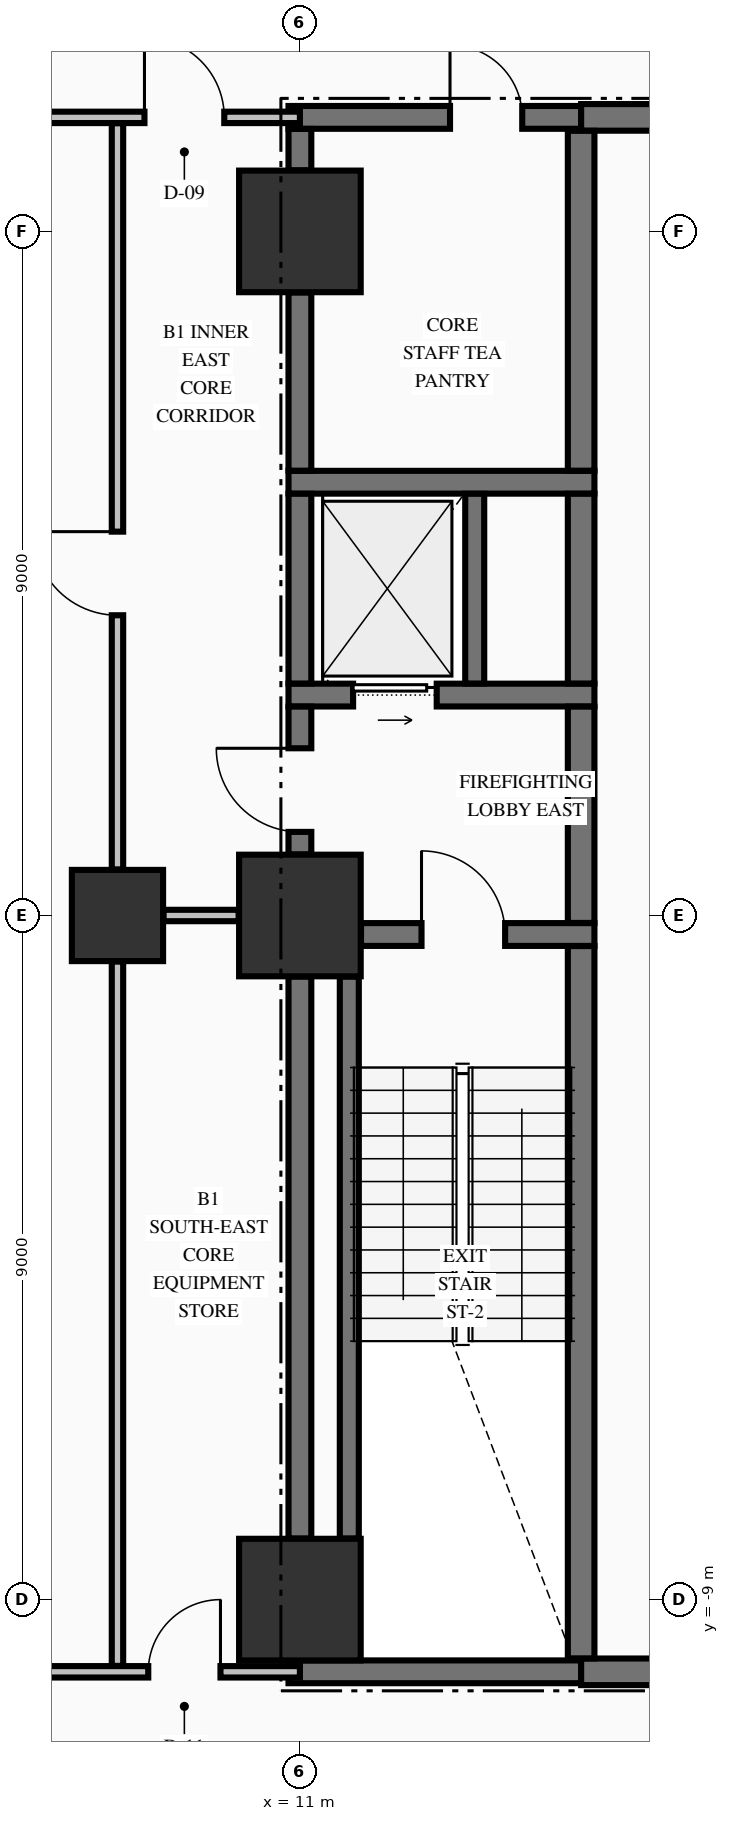
"""IFC4 building model, lengths in metres.
Left out: names, types, materials, properties, quantities, classifications, styles, units other than length and angle.
Written with IfcOpenShell. Run it as: python <this file> out.ifc"""

import sys

from ifc_helpers import new_model, si_unit, direction, frame, frame_2d, origin, origin_2d, place, context, subcontext, project, spatial, rectangle, extrude, element, fill, save


model = new_model("IFC4")
c1 = context("Model", 3, precision=1e-05, world=origin(), true_north=direction((0.0, 1.0)))
c2 = subcontext(c1, "Body", "Model", "MODEL_VIEW")
j1 = project(units=[si_unit("LENGTHUNIT", "METRE"), si_unit("PLANEANGLEUNIT", "RADIAN")], contexts=[c1])
p1 = place(None, origin())
s1 = spatial("IfcSite", under=j1, at=p1, CompositionType="ELEMENT")
p2 = place(p1, origin())
s2 = spatial("IfcBuilding", under=s1, at=p2, CompositionType="ELEMENT")
p3 = place(p2, frame((0.0, 0.0, -4.55)))
s3 = spatial("IfcBuildingStorey", under=s2, at=p3, CompositionType="ELEMENT", Elevation=-4.55)
for number, where, z_axis, x_axis in (
    (1, (11.0, -9.0, 0.0), (0.0, 0.0, 1.0), (1.0, 0.0, 0.0)),
    (2, (11.0, 0.0, 0.0), (0.0, 0.0, 1.0), (1.0, 0.0, 0.0)),
    (3, (11.0, 9.0, 0.0), (0.0, 0.0, 1.0), (1.0, 0.0, 0.0)),
):
    element("IfcColumn", number, at=place(p3, frame(where, z_axis=z_axis, x_axis=x_axis)), inside=s3, PredefinedType="COLUMN", context=c2, shape_type="SweptSolid", body=[
        extrude(rectangle(XDim=1.6, YDim=1.6, at=origin_2d()), origin(), (0.0, 0.0, 1.0), 4.2),
    ])
p4 = place(p3, frame((8.6, 0.0, 0.0), z_axis=(0.0, 0.0, 1.0), x_axis=(1.0, 0.0, 0.0)))
e4 = element("IfcColumn", 4, at=p4, inside=s3, PredefinedType="COLUMN", context=c2, shape_type="SweptSolid", body=[
    extrude(rectangle(XDim=1.2, YDim=1.2, at=origin_2d()), origin(), (0.0, 0.0, 1.0), 4.2),
])
p5 = place(p3, frame((10.85, -9.95, 0.0), z_axis=(0.0, 0.0, 1.0), x_axis=(1.0, 0.0, 0.0)))
e5 = element("IfcWall", 5, at=p5, inside=s3, PredefinedType="SHEAR", context=c2, shape_type="SweptSolid", body=[
    extrude(rectangle(XDim=3.85, YDim=0.3, at=frame_2d((1.925, 0.0))), origin(), (0.0, 0.0, 1.0), 4.2),
])
p6 = place(p3, frame((14.7, -9.95, 0.0), z_axis=(0.0, 0.0, 1.0), x_axis=(1.0, 0.0, 0.0)))
e6 = element("IfcWall", 6, at=p6, inside=s3, PredefinedType="SHEAR", context=c2, shape_type="SweptSolid", body=[
    extrude(rectangle(XDim=4.496, YDim=0.35, at=frame_2d((2.248, 0.0))), origin(), (0.0, 0.0, 1.0), 4.2),
])
p7 = place(p3, frame((11.804, -0.25, 0.0), z_axis=(0.0, 0.0, 1.0), x_axis=(1.0, 0.0, 0.0)))
e7 = element("IfcWall", 7, at=p7, inside=s3, PredefinedType="SHEAR", context=c2, shape_type="SweptSolid", body=[
    extrude(rectangle(XDim=3.071, YDim=0.3, at=frame_2d((1.536, 0.0))), origin(), (0.0, 0.0, 1.0), 4.2),
])
p8 = place(p7, frame((0.796, 0.0, 0.0)))
e8 = element("IfcOpeningElement", 8, at=p8, cuts=e7, PredefinedType="OPENING", context=c2, shape_type="SweptSolid", body=[
    extrude(rectangle(XDim=1.1, YDim=2.15, at=frame_2d((0.55, 1.075))), frame((0.0, 0.16, 0.0), z_axis=(0.0, -1.0, 0.0), x_axis=(1.0, 0.0, 0.0)), (0.0, 0.0, 1.0), 0.32),
])
p9 = place(p3, frame((10.85, 2.9, 0.0), z_axis=(0.0, 0.0, 1.0), x_axis=(1.0, 0.0, 0.0)))
e9 = element("IfcWall", 9, at=p9, inside=s3, PredefinedType="SHEAR", context=c2, shape_type="SweptSolid", body=[
    extrude(rectangle(XDim=4.025, YDim=0.3, at=frame_2d((2.012, 0.0))), origin(), (0.0, 0.0, 1.0), 4.2),
])
p10 = place(p9, frame((0.85, 0.0, 0.0)))
e10 = element("IfcOpeningElement", 10, at=p10, cuts=e9, PredefinedType="OPENING", context=c2, shape_type="SweptSolid", body=[
    extrude(rectangle(XDim=1.1, YDim=2.2, at=frame_2d((0.55, 1.1))), frame((0.0, 0.16, 0.0), z_axis=(0.0, -1.0, 0.0), x_axis=(1.0, 0.0, 0.0)), (0.0, 0.0, 1.0), 0.32),
])
p11 = place(p3, frame((10.85, 5.7, 0.0), z_axis=(0.0, 0.0, 1.0), x_axis=(1.0, 0.0, 0.0)))
e11 = element("IfcWall", 11, at=p11, inside=s3, PredefinedType="SHEAR", context=c2, shape_type="SweptSolid", body=[
    extrude(rectangle(XDim=4.025, YDim=0.3, at=frame_2d((2.012, 0.0))), origin(), (0.0, 0.0, 1.0), 4.2),
])
p12 = place(p3, frame((10.85, 10.5, 0.0), z_axis=(0.0, 0.0, 1.0), x_axis=(1.0, 0.0, 0.0)))
e12 = element("IfcWall", 12, at=p12, inside=s3, PredefinedType="SHEAR", context=c2, shape_type="SweptSolid", body=[
    extrude(rectangle(XDim=3.85, YDim=0.3, at=frame_2d((1.925, 0.0))), origin(), (0.0, 0.0, 1.0), 4.2),
])
p13 = place(p12, frame((2.125, 0.0, 0.0)))
e13 = element("IfcOpeningElement", 13, at=p13, cuts=e12, PredefinedType="OPENING", context=c2, shape_type="SweptSolid", body=[
    extrude(rectangle(XDim=0.95, YDim=2.15, at=frame_2d((0.475, 1.075))), frame((0.0, 0.16, 0.0), z_axis=(0.0, -1.0, 0.0), x_axis=(1.0, 0.0, 0.0)), (0.0, 0.0, 1.0), 0.32),
])
p14 = place(p3, frame((14.7, 10.5, 0.0), z_axis=(0.0, 0.0, 1.0), x_axis=(1.0, 0.0, 0.0)))
e14 = element("IfcWall", 14, at=p14, inside=s3, PredefinedType="SHEAR", context=c2, shape_type="SweptSolid", body=[
    extrude(rectangle(XDim=5.475, YDim=0.35, at=frame_2d((2.738, 0.0))), origin(), (0.0, 0.0, 1.0), 4.2),
])
p15 = place(p14, frame((2.1, 0.0, 0.0)))
e15 = element("IfcOpeningElement", 15, at=p15, cuts=e14, PredefinedType="OPENING", context=c2, shape_type="SweptSolid", body=[
    extrude(rectangle(XDim=1.1, YDim=2.15, at=frame_2d((0.55, 1.075))), frame((0.0, 0.185, 0.0), z_axis=(0.0, -1.0, 0.0), x_axis=(1.0, 0.0, 0.0)), (0.0, 0.0, 1.0), 0.37),
])
p16 = place(p3, frame((-11.0, -9.95, 0.0), z_axis=(0.0, 0.0, 1.0), x_axis=(1.0, 0.0, 0.0)))
e16 = element("IfcWall", 16, at=p16, inside=s3, PredefinedType="PARTITIONING", context=c2, shape_type="SweptSolid", body=[
    extrude(rectangle(XDim=22.0, YDim=0.15, at=frame_2d((11.0, 0.0))), origin(), (0.0, 0.0, 1.0), 4.2),
])
p17 = place(p16, frame((1.045, 0.0, 0.0)))
e17 = element("IfcOpeningElement", 17, at=p17, cuts=e16, PredefinedType="OPENING", context=c2, shape_type="SweptSolid", body=[
    extrude(rectangle(XDim=0.95, YDim=2.15, at=frame_2d((0.475, 1.075))), frame((0.0, 0.085, 0.0), z_axis=(0.0, -1.0, 0.0), x_axis=(1.0, 0.0, 0.0)), (0.0, 0.0, 1.0), 0.17),
])
p18 = place(p16, frame((20.005, 0.0, 0.0)))
e18 = element("IfcOpeningElement", 18, at=p18, cuts=e16, PredefinedType="OPENING", context=c2, shape_type="SweptSolid", body=[
    extrude(rectangle(XDim=0.95, YDim=2.15, at=frame_2d((0.475, 1.075))), frame((0.0, 0.085, 0.0), z_axis=(0.0, -1.0, 0.0), x_axis=(1.0, 0.0, 0.0)), (0.0, 0.0, 1.0), 0.17),
])
p19 = place(p3, frame((9.206, 0.0, 0.0), z_axis=(0.0, 0.0, 1.0), x_axis=(1.0, 0.0, 0.0)))
e19 = element("IfcWall", 19, at=p19, inside=s3, PredefinedType="PARTITIONING", context=c2, shape_type="SweptSolid", body=[
    extrude(rectangle(XDim=0.988, YDim=0.15, at=frame_2d((0.494, 0.0))), origin(), (0.0, 0.0, 1.0), 3.242),
])
p20 = place(p3, frame((-11.0, 10.5, 0.0), z_axis=(0.0, 0.0, 1.0), x_axis=(1.0, 0.0, 0.0)))
e20 = element("IfcWall", 20, at=p20, inside=s3, PredefinedType="PARTITIONING", context=c2, shape_type="SweptSolid", body=[
    extrude(rectangle(XDim=22.0, YDim=0.15, at=frame_2d((11.0, 0.0))), origin(), (0.0, 0.0, 1.0), 4.2),
])
p21 = place(p20, frame((0.995, 0.0, 0.0)))
e21 = element("IfcOpeningElement", 21, at=p21, cuts=e20, PredefinedType="OPENING", context=c2, shape_type="SweptSolid", body=[
    extrude(rectangle(XDim=1.05, YDim=2.15, at=frame_2d((0.525, 1.075))), frame((0.0, 0.085, 0.0), z_axis=(0.0, -1.0, 0.0), x_axis=(1.0, 0.0, 0.0)), (0.0, 0.0, 1.0), 0.17),
])
p22 = place(p20, frame((19.955, 0.0, 0.0)))
e22 = element("IfcOpeningElement", 22, at=p22, cuts=e20, PredefinedType="OPENING", context=c2, shape_type="SweptSolid", body=[
    extrude(rectangle(XDim=1.05, YDim=2.15, at=frame_2d((0.525, 1.075))), frame((0.0, 0.085, 0.0), z_axis=(0.0, -1.0, 0.0), x_axis=(1.0, 0.0, 0.0)), (0.0, 0.0, 1.0), 0.17),
])
p23 = place(p3, frame((11.0, -8.196, 0.0), z_axis=(0.0, 0.0, 1.0), x_axis=(0.0, 1.0, 0.0)))
e23 = element("IfcWall", 23, at=p23, inside=s3, PredefinedType="SHEAR", context=c2, shape_type="SweptSolid", body=[
    extrude(rectangle(XDim=7.392, YDim=0.3, at=frame_2d((3.696, 0.0))), origin(), (0.0, 0.0, 1.0), 4.2),
])
p24 = place(p3, frame((11.0, 0.804, 0.0), z_axis=(0.0, 0.0, 1.0), x_axis=(0.0, 1.0, 0.0)))
e24 = element("IfcWall", 24, at=p24, inside=s3, PredefinedType="SHEAR", context=c2, shape_type="SweptSolid", body=[
    extrude(rectangle(XDim=1.944, YDim=0.3, at=frame_2d((0.972, 0.0))), origin(), (0.0, 0.0, 1.0), 4.2),
])
p25 = place(p24, frame((0.296, 0.0, 0.0)))
e25 = element("IfcOpeningElement", 25, at=p25, cuts=e24, PredefinedType="OPENING", context=c2, shape_type="SweptSolid", body=[
    extrude(rectangle(XDim=1.1, YDim=2.15, at=frame_2d((0.55, 1.075))), frame((0.0, 0.16, 0.0), z_axis=(0.0, -1.0, 0.0), x_axis=(1.0, 0.0, 0.0)), (0.0, 0.0, 1.0), 0.32),
])
p26 = place(p3, frame((11.0, 3.052, 0.0), z_axis=(0.0, 0.0, 1.0), x_axis=(0.0, 1.0, 0.0)))
e26 = element("IfcWall", 26, at=p26, inside=s3, PredefinedType="SHEAR", context=c2, shape_type="SweptSolid", body=[
    extrude(rectangle(XDim=2.496, YDim=0.3, at=frame_2d((1.248, 0.0))), origin(), (0.0, 0.0, 1.0), 4.2),
])
p27 = place(p3, frame((11.0, 5.852, 0.0), z_axis=(0.0, 0.0, 1.0), x_axis=(0.0, 1.0, 0.0)))
e27 = element("IfcWall", 27, at=p27, inside=s3, PredefinedType="SHEAR", context=c2, shape_type="SweptSolid", body=[
    extrude(rectangle(XDim=2.344, YDim=0.3, at=frame_2d((1.172, 0.0))), origin(), (0.0, 0.0, 1.0), 4.2),
])
p28 = place(p3, frame((11.0, 9.804, 0.0), z_axis=(0.0, 0.0, 1.0), x_axis=(0.0, 1.0, 0.0)))
e28 = element("IfcWall", 28, at=p28, inside=s3, PredefinedType="SHEAR", context=c2, shape_type="SweptSolid", body=[
    extrude(rectangle(XDim=0.544, YDim=0.3, at=frame_2d((0.272, 0.0))), origin(), (0.0, 0.0, 1.0), 4.2),
])
p29 = place(p3, frame((11.65, -8.196, 0.0), z_axis=(0.0, 0.0, 1.0), x_axis=(0.0, 1.0, 0.0)))
e29 = element("IfcWall", 29, at=p29, inside=s3, PredefinedType="SOLIDWALL", context=c2, shape_type="SweptSolid", body=[
    extrude(rectangle(XDim=7.392, YDim=0.25, at=frame_2d((3.696, 0.0))), origin(), (0.0, 0.0, 1.0), 4.2),
])
p30 = place(p3, frame((13.3, 3.052, 0.0), z_axis=(0.0, 0.0, 1.0), x_axis=(0.0, 1.0, 0.0)))
e30 = element("IfcWall", 30, at=p30, inside=s3, PredefinedType="SOLIDWALL", context=c2, shape_type="SweptSolid", body=[
    extrude(rectangle(XDim=2.496, YDim=0.25, at=frame_2d((1.248, 0.0))), origin(), (0.0, 0.0, 1.0), 4.2),
])
p31 = place(p3, frame((14.7, -9.773, 0.0), z_axis=(0.0, 0.0, 1.0), x_axis=(0.0, 1.0, 0.0)))
e31 = element("IfcWall", 31, at=p31, inside=s3, PredefinedType="SHEAR", context=c2, shape_type="SweptSolid", body=[
    extrude(rectangle(XDim=9.371, YDim=0.35, at=frame_2d((4.686, 0.0))), origin(), (0.0, 0.0, 1.0), 4.2),
])
p32 = place(p3, frame((14.7, -0.098, 0.0), z_axis=(0.0, 0.0, 1.0), x_axis=(0.0, 1.0, 0.0)))
e32 = element("IfcWall", 32, at=p32, inside=s3, PredefinedType="SHEAR", context=c2, shape_type="SweptSolid", body=[
    extrude(rectangle(XDim=2.846, YDim=0.35, at=frame_2d((1.423, 0.0))), origin(), (0.0, 0.0, 1.0), 4.2),
])
p33 = place(p3, frame((14.7, 3.052, 0.0), z_axis=(0.0, 0.0, 1.0), x_axis=(0.0, 1.0, 0.0)))
e33 = element("IfcWall", 33, at=p33, inside=s3, PredefinedType="SHEAR", context=c2, shape_type="SweptSolid", body=[
    extrude(rectangle(XDim=2.496, YDim=0.35, at=frame_2d((1.248, 0.0))), origin(), (0.0, 0.0, 1.0), 4.2),
])
p34 = place(p3, frame((14.7, 5.852, 0.0), z_axis=(0.0, 0.0, 1.0), x_axis=(0.0, 1.0, 0.0)))
e34 = element("IfcWall", 34, at=p34, inside=s3, PredefinedType="SHEAR", context=c2, shape_type="SweptSolid", body=[
    extrude(rectangle(XDim=4.471, YDim=0.35, at=frame_2d((2.235, 0.0))), origin(), (0.0, 0.0, 1.0), 4.2),
])
p35 = place(p3, frame((8.6, -9.872, 0.0), z_axis=(0.0, 0.0, 1.0), x_axis=(0.0, 1.0, 0.0)))
e35 = element("IfcWall", 35, at=p35, inside=s3, PredefinedType="PARTITIONING", context=c2, shape_type="SweptSolid", body=[
    extrude(rectangle(XDim=9.266, YDim=0.15, at=frame_2d((4.633, 0.0))), origin(), (0.0, 0.0, 1.0), 3.242),
])
p36 = place(p3, frame((8.6, 0.606, 0.0), z_axis=(0.0, 0.0, 1.0), x_axis=(0.0, 1.0, 0.0)))
e36 = element("IfcWall", 36, at=p36, inside=s3, PredefinedType="PARTITIONING", context=c2, shape_type="SweptSolid", body=[
    extrude(rectangle(XDim=9.816, YDim=0.15, at=frame_2d((4.908, 0.0))), origin(), (0.0, 0.0, 1.0), 3.242),
])
p37 = place(p36, frame((3.344, 0.0, 0.0)))
e37 = element("IfcOpeningElement", 37, at=p37, cuts=e36, PredefinedType="OPENING", context=c2, shape_type="SweptSolid", body=[
    extrude(rectangle(XDim=1.1, YDim=2.15, at=frame_2d((0.55, 1.075))), frame((0.0, 0.085, 0.0), z_axis=(0.0, -1.0, 0.0), x_axis=(1.0, 0.0, 0.0)), (0.0, 0.0, 1.0), 0.17),
])
p38 = place(p8, origin())
e38 = element("IfcDoor", 38, at=p38, inside=s3, OperationType="SINGLE_SWING_LEFT", PredefinedType="DOOR", context=c2, shape_type="SweptSolid", body=[
    extrude(rectangle(XDim=1.1, YDim=2.15, at=frame_2d((0.55, 1.075))), frame((0.0, 0.025, 0.0), z_axis=(0.0, -1.0, 0.0), x_axis=(1.0, 0.0, 0.0)), (0.0, 0.0, 1.0), 0.05),
])
fill(e8, e38)
p39 = place(p25, origin())
e39 = element("IfcDoor", 39, at=p39, inside=s3, OperationType="SINGLE_SWING_RIGHT", PredefinedType="DOOR", context=c2, shape_type="SweptSolid", body=[
    extrude(rectangle(XDim=1.1, YDim=2.15, at=frame_2d((0.55, 1.075))), frame((0.0, 0.025, 0.0), z_axis=(0.0, -1.0, 0.0), x_axis=(1.0, 0.0, 0.0)), (0.0, 0.0, 1.0), 0.05),
])
fill(e25, e39)
p40 = place(p10, origin())
e40 = element("IfcDoor", 40, at=p40, inside=s3, OperationType="SLIDING_TO_RIGHT", PredefinedType="DOOR", context=c2, shape_type="SweptSolid", body=[
    extrude(rectangle(XDim=1.1, YDim=2.2, at=frame_2d((0.55, 1.1))), frame((0.0, 0.025, 0.0), z_axis=(0.0, -1.0, 0.0), x_axis=(1.0, 0.0, 0.0)), (0.0, 0.0, 1.0), 0.05),
])
fill(e10, e40)
p41 = place(p13, origin())
e41 = element("IfcDoor", 41, at=p41, inside=s3, OperationType="SINGLE_SWING_LEFT", PredefinedType="DOOR", context=c2, shape_type="SweptSolid", body=[
    extrude(rectangle(XDim=0.95, YDim=2.15, at=frame_2d((0.475, 1.075))), frame((0.0, 0.025, 0.0), z_axis=(0.0, -1.0, 0.0), x_axis=(1.0, 0.0, 0.0)), (0.0, 0.0, 1.0), 0.05),
])
fill(e13, e41)
p42 = place(p22, origin())
e42 = element("IfcDoor", 42, at=p42, inside=s3, OperationType="SINGLE_SWING_LEFT", PredefinedType="DOOR", context=c2, shape_type="SweptSolid", body=[
    extrude(rectangle(XDim=1.05, YDim=2.15, at=frame_2d((0.525, 1.075))), frame((0.0, 0.025, 0.0), z_axis=(0.0, -1.0, 0.0), x_axis=(1.0, 0.0, 0.0)), (0.0, 0.0, 1.0), 0.05),
])
fill(e22, e42)
p43 = place(p18, origin())
e43 = element("IfcDoor", 43, at=p43, inside=s3, OperationType="SINGLE_SWING_RIGHT", PredefinedType="DOOR", context=c2, shape_type="SweptSolid", body=[
    extrude(rectangle(XDim=0.95, YDim=2.15, at=frame_2d((0.475, 1.075))), frame((0.0, 0.025, 0.0), z_axis=(0.0, -1.0, 0.0), x_axis=(1.0, 0.0, 0.0)), (0.0, 0.0, 1.0), 0.05),
])
fill(e18, e43)
p44 = place(p37, origin())
e44 = element("IfcDoor", 44, at=p44, inside=s3, OperationType="SINGLE_SWING_RIGHT", PredefinedType="DOOR", context=c2, shape_type="SweptSolid", body=[
    extrude(rectangle(XDim=1.1, YDim=2.15, at=frame_2d((0.55, 1.075))), frame((0.0, 0.025, 0.0), z_axis=(0.0, -1.0, 0.0), x_axis=(1.0, 0.0, 0.0)), (0.0, 0.0, 1.0), 0.05),
])
fill(e37, e44)
save(model, sys.argv[1])
